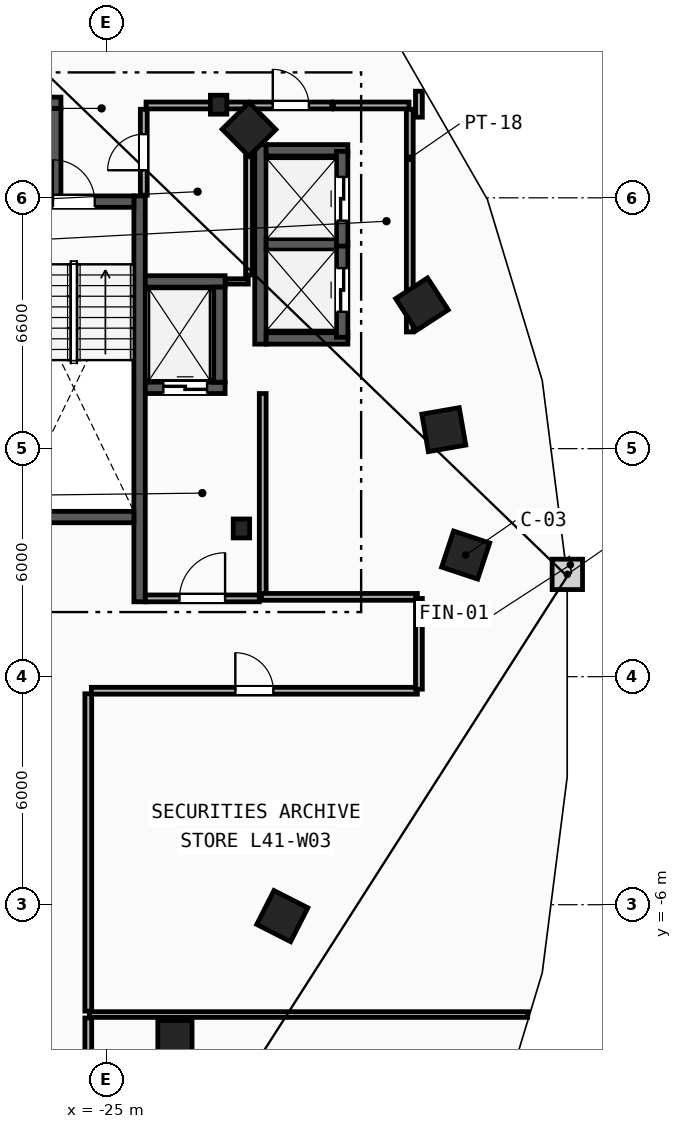
"""IFC4 building model, lengths in metres.
Left out: names, types, materials, properties, quantities, classifications, styles, units other than length and angle.
Written with IfcOpenShell. Run it as: python <this file> out.ifc"""

import sys

from ifc_helpers import new_model, si_unit, direction, frame, frame_2d, origin, origin_2d, place, context, subcontext, project, spatial, rectangle, i_section, extrude, element, fill, save


model = new_model("IFC4")
c1 = context("Model", 3, precision=1e-05, world=origin(), true_north=direction((0.0, 1.0)))
c2 = subcontext(c1, "Body", "Model", "MODEL_VIEW")
j1 = project(units=[si_unit("LENGTHUNIT", "METRE"), si_unit("PLANEANGLEUNIT", "RADIAN")], contexts=[c1])
p1 = place(None, origin())
s1 = spatial("IfcSite", under=j1, at=p1, CompositionType="ELEMENT")
p2 = place(p1, origin())
s2 = spatial("IfcBuilding", under=s1, at=p2, CompositionType="ELEMENT")
p3 = place(p2, frame((0.0, 0.0, 158.4)))
s3 = spatial("IfcBuildingStorey", under=s2, at=p3, CompositionType="ELEMENT", Elevation=158.4)
for number, where, z_axis, x_axis in (
    (1, (-21.45, 3.9, 0.0), (0.0, 0.0, 1.0), (1.0, 0.0, 0.0)),
    (2, (-22.05, 15.05, 0.0), (0.0, 0.0, 1.0), (1.0, 0.0, 0.0)),
):
    element("IfcColumn", number, at=place(p3, frame(where, z_axis=z_axis, x_axis=x_axis)), inside=s3, PredefinedType="COLUMN", context=c2, shape_type="SweptSolid", body=[
        extrude(i_section(OverallWidth=0.432, OverallDepth=0.498, WebThickness=0.056, FlangeThickness=0.089, FilletRadius=0.018, at=origin_2d()), origin(), (0.0, 0.0, 1.0), 3.6),
    ])
p4 = place(p3, frame((-23.2, -9.5, 0.0), z_axis=(0.0, 0.0, 1.0), x_axis=(1.0, 0.0, 0.0)))
e3 = element("IfcColumn", 3, at=p4, inside=s3, PredefinedType="COLUMN", context=c2, shape_type="SweptSolid", body=[
    extrude(rectangle(XDim=0.9, YDim=0.9, at=origin_2d()), origin(), (0.0, 0.0, 1.0), 3.6),
])
for number, where, z_axis, x_axis in (
    (4, (-15.55, 3.2, 0.0), (0.0, 0.0, 1.0), (0.315, 0.949, 0.0)),
    (5, (-16.125, 6.5, 0.0), (0.0, 0.0, 1.0), (-0.172, 0.985, 0.0)),
    (6, (-16.7, 9.8, 0.0), (0.0, 0.0, 1.0), (-0.544, 0.839, 0.0)),
    (7, (-21.25, 14.4, 0.0), (0.0, 0.0, 1.0), (-0.703, 0.711, 0.0)),
    (8, (-20.375, -6.3, 0.0), (0.0, 0.0, 1.0), (0.453, 0.892, 0.0)),
):
    element("IfcColumn", number, at=place(p3, frame(where, z_axis=z_axis, x_axis=x_axis)), inside=s3, PredefinedType="COLUMN", context=c2, shape_type="SweptSolid", body=[
        extrude(rectangle(XDim=1.0, YDim=1.0, at=origin_2d()), origin(), (0.0, 0.0, 1.0), 3.6),
    ])
p5 = place(p3, frame((-24.13, 1.97, 0.0), z_axis=(0.0, 0.0, 1.0), x_axis=(0.0, 1.0, 0.0)))
e9 = element("IfcWall", 9, at=p5, inside=s3, PredefinedType="SHEAR", context=c2, shape_type="SweptSolid", body=[
    extrude(rectangle(XDim=10.68, YDim=0.3, at=frame_2d((5.34, 0.0))), origin(), (0.0, 0.0, 1.0), 3.36),
])
p6 = place(p3, frame((-27.44, 12.5, 0.0), z_axis=(0.0, 0.0, 1.0), x_axis=(1.0, 0.0, 0.0)))
e10 = element("IfcWall", 10, at=p6, inside=s3, PredefinedType="SHEAR", context=c2, shape_type="SweptSolid", body=[
    extrude(rectangle(XDim=3.16, YDim=0.3, at=frame_2d((1.58, 0.0))), origin(), (0.0, 0.0, 1.0), 3.36),
])
p7 = place(p6, frame((1.03, 0.0, 0.0)))
e11 = element("IfcOpeningElement", 11, at=p7, cuts=e10, PredefinedType="OPENING", context=c2, shape_type="SweptSolid", body=[
    extrude(rectangle(XDim=1.1, YDim=2.15, at=frame_2d((0.55, 1.075))), frame((0.0, 0.16, 0.0), z_axis=(0.0, -1.0, 0.0), x_axis=(1.0, 0.0, 0.0)), (0.0, 0.0, 1.0), 0.32),
])
p8 = place(p3, frame((-27.44, 4.2, 0.0), z_axis=(0.0, 0.0, 1.0), x_axis=(1.0, 0.0, 0.0)))
e12 = element("IfcWall", 12, at=p8, inside=s3, PredefinedType="SHEAR", context=c2, shape_type="SweptSolid", body=[
    extrude(rectangle(XDim=3.16, YDim=0.3, at=frame_2d((1.58, 0.0))), origin(), (0.0, 0.0, 1.0), 3.36),
])
p9 = place(p3, frame((-20.89, 2.15, 0.0), z_axis=(0.0, 0.0, 1.0), x_axis=(0.0, 1.0, 0.0)))
e13 = element("IfcWall", 13, at=p9, inside=s3, PredefinedType="PARTITIONING", context=c2, shape_type="SweptSolid", body=[
    extrude(rectangle(XDim=5.3, YDim=0.18, at=frame_2d((2.65, 0.0))), origin(), (0.0, 0.0, 1.0), 3.36),
])
p10 = place(p3, frame((-23.98, 2.06, 0.0), z_axis=(0.0, 0.0, 1.0), x_axis=(1.0, 0.0, 0.0)))
e14 = element("IfcWall", 14, at=p10, inside=s3, PredefinedType="PARTITIONING", context=c2, shape_type="SweptSolid", body=[
    extrude(rectangle(XDim=3.0, YDim=0.18, at=frame_2d((1.5, 0.0))), origin(), (0.0, 0.0, 1.0), 3.36),
])
p11 = place(p10, frame((0.9, 0.0, 0.0)))
e15 = element("IfcOpeningElement", 15, at=p11, cuts=e14, PredefinedType="OPENING", context=c2, shape_type="SweptSolid", body=[
    extrude(rectangle(XDim=1.2, YDim=2.15, at=frame_2d((0.6, 1.075))), frame((0.0, 0.1, 0.0), z_axis=(0.0, -1.0, 0.0), x_axis=(1.0, 0.0, 0.0)), (0.0, 0.0, 1.0), 0.2),
])
p12 = place(p3, frame((-23.98, 7.6, 0.0), z_axis=(0.0, 0.0, 1.0), x_axis=(1.0, 0.0, 0.0)))
e16 = element("IfcWall", 16, at=p12, inside=s3, PredefinedType="SHEAR", context=c2, shape_type="SweptSolid", body=[
    extrude(rectangle(XDim=2.1, YDim=0.3, at=frame_2d((1.05, 0.0))), origin(), (0.0, 0.0, 1.0), 3.36),
])
p13 = place(p12, frame((0.475, 0.0, 0.0)))
e17 = element("IfcOpeningElement", 17, at=p13, cuts=e16, PredefinedType="OPENING", context=c2, shape_type="SweptSolid", body=[
    extrude(rectangle(XDim=1.15, YDim=2.2, at=frame_2d((0.575, 1.1))), frame((0.0, 0.16, 0.0), z_axis=(0.0, -1.0, 0.0), x_axis=(1.0, 0.0, 0.0)), (0.0, 0.0, 1.0), 0.32),
])
p14 = place(p3, frame((-23.98, 10.4, 0.0), z_axis=(0.0, 0.0, 1.0), x_axis=(1.0, 0.0, 0.0)))
e18 = element("IfcWall", 18, at=p14, inside=s3, PredefinedType="SHEAR", context=c2, shape_type="SweptSolid", body=[
    extrude(rectangle(XDim=2.1, YDim=0.3, at=frame_2d((1.05, 0.0))), origin(), (0.0, 0.0, 1.0), 3.36),
])
for number, where, z_axis, x_axis in (
    (19, (-22.03, 7.75, 0.0), (0.0, 0.0, 1.0), (0.0, 1.0, 0.0)),
    (20, (-28.7, 15.1, 0.0), (0.0, 0.0, 1.0), (1.0, 0.0, 0.0)),
):
    element("IfcWall", number, at=place(p3, frame(where, z_axis=z_axis, x_axis=x_axis)), inside=s3, PredefinedType="SHEAR", context=c2, shape_type="SweptSolid", body=[
        extrude(rectangle(XDim=2.5, YDim=0.3, at=frame_2d((1.25, 0.0))), origin(), (0.0, 0.0, 1.0), 3.36),
    ])
p15 = place(p3, frame((-26.35, 12.65, 0.0), z_axis=(0.0, 0.0, 1.0), x_axis=(0.0, 1.0, 0.0)))
e21 = element("IfcWall", 21, at=p15, inside=s3, PredefinedType="SHEAR", context=c2, shape_type="SweptSolid", body=[
    extrude(rectangle(XDim=2.3, YDim=0.3, at=frame_2d((1.15, 0.0))), origin(), (0.0, 0.0, 1.0), 3.36),
])
p16 = place(p3, frame((-20.95, 8.75, 0.0), z_axis=(0.0, 0.0, 1.0), x_axis=(0.0, 1.0, 0.0)))
e22 = element("IfcWall", 22, at=p16, inside=s3, PredefinedType="SHEAR", context=c2, shape_type="SweptSolid", body=[
    extrude(rectangle(XDim=5.25, YDim=0.3, at=frame_2d((2.625, 0.0))), origin(), (0.0, 0.0, 1.0), 3.36),
])
for number, where, z_axis, x_axis in (
    (23, (-20.8, 8.9, 0.0), (0.0, 0.0, 1.0), (1.0, 0.0, 0.0)),
    (24, (-20.8, 13.85, 0.0), (0.0, 0.0, 1.0), (1.0, 0.0, 0.0)),
):
    element("IfcWall", number, at=place(p3, frame(where, z_axis=z_axis, x_axis=x_axis)), inside=s3, PredefinedType="SHEAR", context=c2, shape_type="SweptSolid", body=[
        extrude(rectangle(XDim=2.15, YDim=0.3, at=frame_2d((1.075, 0.0))), origin(), (0.0, 0.0, 1.0), 3.36),
    ])
p17 = place(p3, frame((-20.8, 11.375, 0.0), z_axis=(0.0, 0.0, 1.0), x_axis=(1.0, 0.0, 0.0)))
e25 = element("IfcWall", 25, at=p17, inside=s3, PredefinedType="SHEAR", context=c2, shape_type="SweptSolid", body=[
    extrude(rectangle(XDim=1.85, YDim=0.3, at=frame_2d((0.925, 0.0))), origin(), (0.0, 0.0, 1.0), 3.36),
])
p18 = place(p3, frame((-18.8, 8.93, 0.0), z_axis=(0.0, 0.0, 1.0), x_axis=(0.0, 1.0, 0.0)))
e26 = element("IfcWall", 26, at=p18, inside=s3, PredefinedType="SHEAR", context=c2, shape_type="SweptSolid", body=[
    extrude(rectangle(XDim=2.49, YDim=0.3, at=frame_2d((1.245, 0.0))), origin(), (0.0, 0.0, 1.0), 3.36),
])
p19 = place(p18, frame((0.67, 0.0, 0.0)))
e27 = element("IfcOpeningElement", 27, at=p19, cuts=e26, PredefinedType="OPENING", context=c2, shape_type="SweptSolid", body=[
    extrude(rectangle(XDim=1.15, YDim=2.2, at=frame_2d((0.575, 1.1))), frame((0.0, 0.16, 0.0), z_axis=(0.0, -1.0, 0.0), x_axis=(1.0, 0.0, 0.0)), (0.0, 0.0, 1.0), 0.32),
])
p20 = place(p3, frame((-18.8, 11.33, 0.0), z_axis=(0.0, 0.0, 1.0), x_axis=(0.0, 1.0, 0.0)))
e28 = element("IfcWall", 28, at=p20, inside=s3, PredefinedType="SHEAR", context=c2, shape_type="SweptSolid", body=[
    extrude(rectangle(XDim=2.49, YDim=0.3, at=frame_2d((1.245, 0.0))), origin(), (0.0, 0.0, 1.0), 3.36),
])
p21 = place(p20, frame((0.67, 0.0, 0.0)))
e29 = element("IfcOpeningElement", 29, at=p21, cuts=e28, PredefinedType="OPENING", context=c2, shape_type="SweptSolid", body=[
    extrude(rectangle(XDim=1.15, YDim=2.2, at=frame_2d((0.575, 1.1))), frame((0.0, 0.16, 0.0), z_axis=(0.0, -1.0, 0.0), x_axis=(1.0, 0.0, 0.0)), (0.0, 0.0, 1.0), 0.32),
])
p22 = place(p3, frame((-17.02, 9.07, 0.0), z_axis=(0.0, 0.0, 1.0), x_axis=(0.0, 1.0, 0.0)))
e30 = element("IfcWall", 30, at=p22, inside=s3, PredefinedType="PARTITIONING", context=c2, shape_type="SweptSolid", body=[
    extrude(rectangle(XDim=5.86, YDim=0.18, at=frame_2d((2.93, 0.0))), origin(), (0.0, 0.0, 1.0), 3.36),
])
p23 = place(p3, frame((-21.23, 15.03, 0.0), z_axis=(0.0, 0.0, 1.0), x_axis=(1.0, 0.0, 0.0)))
e31 = element("IfcWall", 31, at=p23, inside=s3, PredefinedType="PARTITIONING", context=c2, shape_type="SweptSolid", body=[
    extrude(rectangle(XDim=2.16, YDim=0.18, at=frame_2d((1.08, 0.0))), origin(), (0.0, 0.0, 1.0), 3.36),
])
p24 = place(p23, frame((0.605, 0.0, 0.0)))
e32 = element("IfcOpeningElement", 32, at=p24, cuts=e31, PredefinedType="OPENING", context=c2, shape_type="SweptSolid", body=[
    extrude(rectangle(XDim=0.95, YDim=2.1, at=frame_2d((0.475, 1.05))), frame((0.0, 0.1, 0.0), z_axis=(0.0, -1.0, 0.0), x_axis=(1.0, 0.0, 0.0)), (0.0, 0.0, 1.0), 0.2),
])
p25 = place(p3, frame((-19.03, 15.03, 0.0), z_axis=(0.0, 0.0, 1.0), x_axis=(1.0, 0.0, 0.0)))
e33 = element("IfcWall", 33, at=p25, inside=s3, PredefinedType="PARTITIONING", context=c2, shape_type="SweptSolid", body=[
    extrude(rectangle(XDim=1.99, YDim=0.18, at=frame_2d((0.995, 0.0))), origin(), (0.0, 0.0, 1.0), 3.36),
])
p26 = place(p3, frame((-21.86, 10.4, 0.0), z_axis=(0.0, 0.0, 1.0), x_axis=(1.0, 0.0, 0.0)))
e34 = element("IfcWall", 34, at=p26, inside=s3, PredefinedType="PARTITIONING", context=c2, shape_type="SweptSolid", body=[
    extrude(rectangle(XDim=0.59, YDim=0.14, at=frame_2d((0.295, 0.0))), origin(), (0.0, 0.0, 1.0), 3.36),
])
p27 = place(p3, frame((-21.25, 10.57, 0.0), z_axis=(0.0, 0.0, 1.0), x_axis=(0.0, 1.0, 0.0)))
e35 = element("IfcWall", 35, at=p27, inside=s3, PredefinedType="PARTITIONING", context=c2, shape_type="SweptSolid", body=[
    extrude(rectangle(XDim=4.36, YDim=0.18, at=frame_2d((2.18, 0.0))), origin(), (0.0, 0.0, 1.0), 3.36),
])
p28 = place(p3, frame((-23.96, 15.03, 0.0), z_axis=(0.0, 0.0, 1.0), x_axis=(1.0, 0.0, 0.0)))
e36 = element("IfcWall", 36, at=p28, inside=s3, PredefinedType="PARTITIONING", context=c2, shape_type="SweptSolid", body=[
    extrude(rectangle(XDim=2.61, YDim=0.18, at=frame_2d((1.305, 0.0))), origin(), (0.0, 0.0, 1.0), 2.433),
])
p29 = place(p3, frame((-24.02, 12.67, 0.0), z_axis=(0.0, 0.0, 1.0), x_axis=(0.0, 1.0, 0.0)))
e37 = element("IfcWall", 37, at=p29, inside=s3, PredefinedType="PARTITIONING", context=c2, shape_type="SweptSolid", body=[
    extrude(rectangle(XDim=2.26, YDim=0.18, at=frame_2d((1.13, 0.0))), origin(), (0.0, 0.0, 1.0), 3.36),
])
p30 = place(p29, frame((0.655, 0.0, 0.0)))
e38 = element("IfcOpeningElement", 38, at=p30, cuts=e37, PredefinedType="OPENING", context=c2, shape_type="SweptSolid", body=[
    extrude(rectangle(XDim=0.95, YDim=2.1, at=frame_2d((0.475, 1.05))), frame((0.0, 0.1, 0.0), z_axis=(0.0, -1.0, 0.0), x_axis=(1.0, 0.0, 0.0)), (0.0, 0.0, 1.0), 0.2),
])
p31 = place(p3, frame((-25.45, -8.89, 0.0), z_axis=(0.0, 0.0, 1.0), x_axis=(1.0, 0.0, 0.0)))
e39 = element("IfcWall", 39, at=p31, inside=s3, PredefinedType="PARTITIONING", context=c2, shape_type="SweptSolid", body=[
    extrude(rectangle(XDim=11.532, YDim=0.15, at=frame_2d((5.766, 0.0))), origin(), (0.0, 0.0, 1.0), 3.36),
])
p32 = place(p3, frame((-25.48, -11.178, 0.0), z_axis=(0.0, 0.0, 1.0), x_axis=(0.0, 1.0, 0.0)))
e40 = element("IfcWall", 40, at=p32, inside=s3, PredefinedType="PARTITIONING", context=c2, shape_type="SweptSolid", body=[
    extrude(rectangle(XDim=2.198, YDim=0.18, at=frame_2d((1.099, 0.0))), origin(), (0.0, 0.0, 1.0), 3.36),
])
p33 = place(p3, frame((-25.4, -0.37, 0.0), z_axis=(0.0, 0.0, 1.0), x_axis=(1.0, 0.0, 0.0)))
e41 = element("IfcWall", 41, at=p33, inside=s3, PredefinedType="PARTITIONING", context=c2, shape_type="SweptSolid", body=[
    extrude(rectangle(XDim=8.578, YDim=0.18, at=frame_2d((4.289, 0.0))), origin(), (0.0, 0.0, 1.0), 3.36),
])
p34 = place(p33, frame((3.789, 0.0, 0.0)))
e42 = element("IfcOpeningElement", 42, at=p34, cuts=e41, PredefinedType="OPENING", context=c2, shape_type="SweptSolid", body=[
    extrude(rectangle(XDim=1.0, YDim=2.15, at=frame_2d((0.5, 1.075))), frame((0.0, 0.1, 0.0), z_axis=(0.0, -1.0, 0.0), x_axis=(1.0, 0.0, 0.0)), (0.0, 0.0, 1.0), 0.2),
])
p35 = place(p3, frame((-25.48, -8.8, 0.0), z_axis=(0.0, 0.0, 1.0), x_axis=(0.0, 1.0, 0.0)))
e43 = element("IfcWall", 43, at=p35, inside=s3, PredefinedType="PARTITIONING", context=c2, shape_type="SweptSolid", body=[
    extrude(rectangle(XDim=8.35, YDim=0.18, at=frame_2d((4.175, 0.0))), origin(), (0.0, 0.0, 1.0), 3.36),
])
p36 = place(p3, frame((-16.822, 2.1, 0.0), z_axis=(0.0, 0.0, 1.0), x_axis=(-1.0, 0.0, 0.0)))
e44 = element("IfcWall", 44, at=p36, inside=s3, PredefinedType="PARTITIONING", context=c2, shape_type="SweptSolid", body=[
    extrude(rectangle(XDim=4.098, YDim=0.18, at=frame_2d((2.049, 0.0))), origin(), (0.0, 0.0, 1.0), 3.36),
])
p37 = place(p3, frame((-16.78, -0.329, 0.0), z_axis=(0.0, 0.0, 1.0), x_axis=(0.0, 1.0, 0.0)))
e45 = element("IfcWall", 45, at=p37, inside=s3, PredefinedType="PARTITIONING", context=c2, shape_type="SweptSolid", body=[
    extrude(rectangle(XDim=2.387, YDim=0.18, at=frame_2d((1.194, 0.0))), origin(), (0.0, 0.0, 1.0), 3.36),
])
p38 = place(p3, frame((-16.78, 14.721, 0.0), z_axis=(0.0, 0.0, 1.0), x_axis=(0.0, 1.0, 0.0)))
e46 = element("IfcWall", 46, at=p38, inside=s3, PredefinedType="PARTITIONING", context=c2, shape_type="SweptSolid", body=[
    extrude(rectangle(XDim=0.684, YDim=0.18, at=frame_2d((0.342, 0.0))), origin(), (0.0, 0.0, 1.0), 3.36),
])
p39 = place(p7, origin())
e47 = element("IfcDoor", 47, at=p39, inside=s3, OperationType="SINGLE_SWING_LEFT", PredefinedType="DOOR", context=c2, shape_type="SweptSolid", body=[
    extrude(rectangle(XDim=1.1, YDim=2.15, at=frame_2d((0.55, 1.075))), frame((0.0, 0.025, 0.0), z_axis=(0.0, -1.0, 0.0), x_axis=(1.0, 0.0, 0.0)), (0.0, 0.0, 1.0), 0.05),
])
fill(e11, e47)
p40 = place(p11, origin())
e48 = element("IfcDoor", 48, at=p40, inside=s3, OperationType="SINGLE_SWING_RIGHT", PredefinedType="DOOR", context=c2, shape_type="SweptSolid", body=[
    extrude(rectangle(XDim=1.2, YDim=2.15, at=frame_2d((0.6, 1.075))), frame((0.0, 0.025, 0.0), z_axis=(0.0, -1.0, 0.0), x_axis=(1.0, 0.0, 0.0)), (0.0, 0.0, 1.0), 0.05),
])
fill(e15, e48)
p41 = place(p13, origin())
e49 = element("IfcDoor", 49, at=p41, inside=s3, OperationType="SLIDING_TO_LEFT", PredefinedType="TRAPDOOR", context=c2, shape_type="SweptSolid", body=[
    extrude(rectangle(XDim=1.15, YDim=2.2, at=frame_2d((0.575, 1.1))), frame((0.0, 0.025, 0.0), z_axis=(0.0, -1.0, 0.0), x_axis=(1.0, 0.0, 0.0)), (0.0, 0.0, 1.0), 0.05),
])
fill(e17, e49)
p42 = place(p19, origin())
e50 = element("IfcDoor", 50, at=p42, inside=s3, OperationType="SLIDING_TO_LEFT", PredefinedType="TRAPDOOR", context=c2, shape_type="SweptSolid", body=[
    extrude(rectangle(XDim=1.15, YDim=2.2, at=frame_2d((0.575, 1.1))), frame((0.0, 0.025, 0.0), z_axis=(0.0, -1.0, 0.0), x_axis=(1.0, 0.0, 0.0)), (0.0, 0.0, 1.0), 0.05),
])
fill(e27, e50)
p43 = place(p21, origin())
e51 = element("IfcDoor", 51, at=p43, inside=s3, OperationType="SLIDING_TO_LEFT", PredefinedType="TRAPDOOR", context=c2, shape_type="SweptSolid", body=[
    extrude(rectangle(XDim=1.15, YDim=2.2, at=frame_2d((0.575, 1.1))), frame((0.0, 0.025, 0.0), z_axis=(0.0, -1.0, 0.0), x_axis=(1.0, 0.0, 0.0)), (0.0, 0.0, 1.0), 0.05),
])
fill(e29, e51)
p44 = place(p34, origin())
e52 = element("IfcDoor", 52, at=p44, inside=s3, OperationType="SINGLE_SWING_LEFT", PredefinedType="DOOR", context=c2, shape_type="SweptSolid", body=[
    extrude(rectangle(XDim=1.0, YDim=2.15, at=frame_2d((0.5, 1.075))), frame((0.0, 0.025, 0.0), z_axis=(0.0, -1.0, 0.0), x_axis=(1.0, 0.0, 0.0)), (0.0, 0.0, 1.0), 0.05),
])
fill(e42, e52)
p45 = place(p30, origin())
e53 = element("IfcDoor", 53, at=p45, inside=s3, OperationType="SINGLE_SWING_LEFT", PredefinedType="DOOR", context=c2, shape_type="SweptSolid", body=[
    extrude(rectangle(XDim=0.95, YDim=2.1, at=frame_2d((0.475, 1.05))), frame((0.0, 0.025, 0.0), z_axis=(0.0, -1.0, 0.0), x_axis=(1.0, 0.0, 0.0)), (0.0, 0.0, 1.0), 0.05),
])
fill(e38, e53)
p46 = place(p24, origin())
e54 = element("IfcDoor", 54, at=p46, inside=s3, OperationType="SINGLE_SWING_LEFT", PredefinedType="DOOR", context=c2, shape_type="SweptSolid", body=[
    extrude(rectangle(XDim=0.95, YDim=2.1, at=frame_2d((0.475, 1.05))), frame((0.0, 0.025, 0.0), z_axis=(0.0, -1.0, 0.0), x_axis=(1.0, 0.0, 0.0)), (0.0, 0.0, 1.0), 0.05),
])
fill(e32, e54)
save(model, sys.argv[1])
